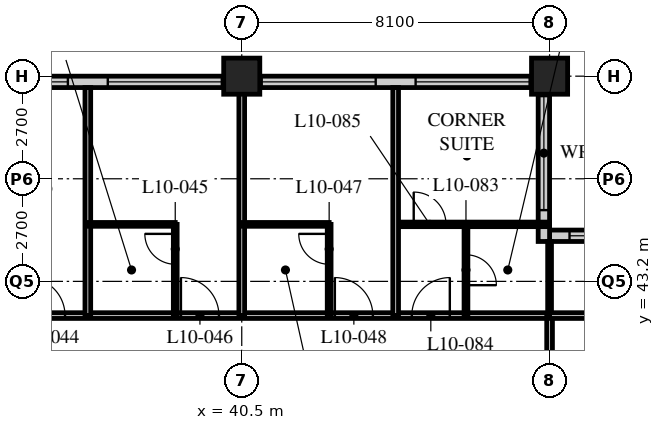
"""IFC4 building model, lengths in metres.
Left out: names, types, materials, properties, quantities, classifications, styles, units other than length and angle.
Written with IfcOpenShell. Run it as: python <this file> out.ifc"""

import sys

from ifc_helpers import new_model, si_unit, direction, frame, frame_2d, origin, origin_2d, place, context, subcontext, project, spatial, rectangle, hollow_rectangle, extrude, element, fill, save


model = new_model("IFC4")
c1 = context("Model", 3, precision=1e-05, world=origin(), true_north=direction((0.0, 1.0)))
c2 = subcontext(c1, "Body", "Model", "MODEL_VIEW")
j1 = project(units=[si_unit("LENGTHUNIT", "METRE"), si_unit("PLANEANGLEUNIT", "RADIAN")], contexts=[c1])
p1 = place(None, origin())
s1 = spatial("IfcSite", under=j1, at=p1, CompositionType="ELEMENT")
p2 = place(p1, origin())
s2 = spatial("IfcBuilding", under=s1, at=p2, CompositionType="ELEMENT")
p3 = place(p2, frame((0.0, 0.0, 46.6)))
s3 = spatial("IfcBuildingStorey", under=s2, at=p3, CompositionType="ELEMENT", Elevation=46.6)
for number, where, z_axis, x_axis in (
    (1, (40.5, 48.6, 0.0), (0.0, 0.0, 1.0), (1.0, 0.0, 0.0)),
    (2, (48.6, 48.6, 0.0), (0.0, 0.0, 1.0), (1.0, 0.0, 0.0)),
):
    element("IfcColumn", number, at=place(p3, frame(where, z_axis=z_axis, x_axis=x_axis)), inside=s3, PredefinedType="COLUMN", context=c2, shape_type="SweptSolid", body=[
        extrude(hollow_rectangle(XDim=0.95, YDim=0.95, WallThickness=0.095, at=origin_2d()), origin(), (0.0, 0.0, 1.0), 3.4),
    ])
p4 = place(p3, frame((52.35, 44.4, 0.0), z_axis=(0.0, 0.0, 1.0), x_axis=(-1.0, 0.0, 0.0)))
e3 = element("IfcWall", 3, at=p4, inside=s3, PredefinedType="SOLIDWALL", context=c2, shape_type="SweptSolid", body=[
    extrude(rectangle(XDim=3.75, YDim=0.3, at=frame_2d((1.875, 0.0))), origin(), (0.0, 0.0, 1.0), 3.19),
])
p5 = place(p4, frame((0.225, 0.0, 0.9)))
e4 = element("IfcOpeningElement", 4, at=p5, cuts=e3, PredefinedType="OPENING", context=c2, shape_type="SweptSolid", body=[
    extrude(rectangle(XDim=3.0, YDim=1.5, at=frame_2d((1.5, 0.75))), frame((0.0, 0.16, 0.0), z_axis=(0.0, -1.0, 0.0), x_axis=(1.0, 0.0, 0.0)), (0.0, 0.0, 1.0), 0.32),
])
p6 = place(p3, frame((48.45, 44.25, 0.0), z_axis=(0.0, 0.0, 1.0), x_axis=(0.0, 1.0, 0.0)))
e5 = element("IfcWall", 5, at=p6, inside=s3, PredefinedType="SOLIDWALL", context=c2, shape_type="SweptSolid", body=[
    extrude(rectangle(XDim=4.35, YDim=0.3, at=frame_2d((2.175, 0.0))), origin(), (0.0, 0.0, 1.0), 3.19),
])
p7 = place(p6, frame((0.825, 0.0, 0.9)))
e6 = element("IfcOpeningElement", 6, at=p7, cuts=e5, PredefinedType="OPENING", context=c2, shape_type="SweptSolid", body=[
    extrude(rectangle(XDim=3.0, YDim=1.5, at=frame_2d((1.5, 0.75))), frame((0.0, 0.16, 0.0), z_axis=(0.0, -1.0, 0.0), x_axis=(1.0, 0.0, 0.0)), (0.0, 0.0, 1.0), 0.32),
])
p8 = place(p3, frame((48.3, 48.45, 0.0), z_axis=(0.0, 0.0, 1.0), x_axis=(-1.0, 0.0, 0.0)))
e7 = element("IfcWall", 7, at=p8, inside=s3, PredefinedType="SOLIDWALL", context=c2, shape_type="SweptSolid", body=[
    extrude(rectangle(XDim=40.2, YDim=0.3, at=frame_2d((20.1, 0.0))), origin(), (0.0, 0.0, 1.0), 3.19),
])
p9 = place(p8, frame((0.225, 0.0, 0.9)))
e8 = element("IfcOpeningElement", 8, at=p9, cuts=e7, PredefinedType="OPENING", context=c2, shape_type="SweptSolid", body=[
    extrude(rectangle(XDim=3.0, YDim=2.0, at=frame_2d((1.5, 1.0))), frame((0.0, 0.16, 0.0), z_axis=(0.0, -1.0, 0.0), x_axis=(1.0, 0.0, 0.0)), (0.0, 0.0, 1.0), 0.32),
])
p10 = place(p8, frame((4.275, 0.0, 0.9)))
e9 = element("IfcOpeningElement", 9, at=p10, cuts=e7, PredefinedType="OPENING", context=c2, shape_type="SweptSolid", body=[
    extrude(rectangle(XDim=3.0, YDim=2.0, at=frame_2d((1.5, 1.0))), frame((0.0, 0.16, 0.0), z_axis=(0.0, -1.0, 0.0), x_axis=(1.0, 0.0, 0.0)), (0.0, 0.0, 1.0), 0.32),
])
p11 = place(p8, frame((8.325, 0.0, 0.9)))
e10 = element("IfcOpeningElement", 10, at=p11, cuts=e7, PredefinedType="OPENING", context=c2, shape_type="SweptSolid", body=[
    extrude(rectangle(XDim=3.0, YDim=2.0, at=frame_2d((1.5, 1.0))), frame((0.0, 0.16, 0.0), z_axis=(0.0, -1.0, 0.0), x_axis=(1.0, 0.0, 0.0)), (0.0, 0.0, 1.0), 0.32),
])
p12 = place(p8, frame((12.375, 0.0, 0.9)))
e11 = element("IfcOpeningElement", 11, at=p12, cuts=e7, PredefinedType="OPENING", context=c2, shape_type="SweptSolid", body=[
    extrude(rectangle(XDim=3.0, YDim=2.0, at=frame_2d((1.5, 1.0))), frame((0.0, 0.16, 0.0), z_axis=(0.0, -1.0, 0.0), x_axis=(1.0, 0.0, 0.0)), (0.0, 0.0, 1.0), 0.32),
])
p13 = place(p8, frame((16.425, 0.0, 0.9)))
e12 = element("IfcOpeningElement", 12, at=p13, cuts=e7, PredefinedType="OPENING", context=c2, shape_type="SweptSolid", body=[
    extrude(rectangle(XDim=3.0, YDim=2.0, at=frame_2d((1.5, 1.0))), frame((0.0, 0.16, 0.0), z_axis=(0.0, -1.0, 0.0), x_axis=(1.0, 0.0, 0.0)), (0.0, 0.0, 1.0), 0.32),
])
p14 = place(p8, frame((20.475, 0.0, 0.9)))
e13 = element("IfcOpeningElement", 13, at=p14, cuts=e7, PredefinedType="OPENING", context=c2, shape_type="SweptSolid", body=[
    extrude(rectangle(XDim=3.0, YDim=2.0, at=frame_2d((1.5, 1.0))), frame((0.0, 0.16, 0.0), z_axis=(0.0, -1.0, 0.0), x_axis=(1.0, 0.0, 0.0)), (0.0, 0.0, 1.0), 0.32),
])
p15 = place(p8, frame((24.525, 0.0, 0.9)))
e14 = element("IfcOpeningElement", 14, at=p15, cuts=e7, PredefinedType="OPENING", context=c2, shape_type="SweptSolid", body=[
    extrude(rectangle(XDim=3.0, YDim=2.0, at=frame_2d((1.5, 1.0))), frame((0.0, 0.16, 0.0), z_axis=(0.0, -1.0, 0.0), x_axis=(1.0, 0.0, 0.0)), (0.0, 0.0, 1.0), 0.32),
])
p16 = place(p8, frame((28.575, 0.0, 0.9)))
e15 = element("IfcOpeningElement", 15, at=p16, cuts=e7, PredefinedType="OPENING", context=c2, shape_type="SweptSolid", body=[
    extrude(rectangle(XDim=3.0, YDim=2.0, at=frame_2d((1.5, 1.0))), frame((0.0, 0.16, 0.0), z_axis=(0.0, -1.0, 0.0), x_axis=(1.0, 0.0, 0.0)), (0.0, 0.0, 1.0), 0.32),
])
p17 = place(p8, frame((32.625, 0.0, 0.9)))
e16 = element("IfcOpeningElement", 16, at=p17, cuts=e7, PredefinedType="OPENING", context=c2, shape_type="SweptSolid", body=[
    extrude(rectangle(XDim=3.0, YDim=2.0, at=frame_2d((1.5, 1.0))), frame((0.0, 0.16, 0.0), z_axis=(0.0, -1.0, 0.0), x_axis=(1.0, 0.0, 0.0)), (0.0, 0.0, 1.0), 0.32),
])
p18 = place(p8, frame((36.675, 0.0, 0.9)))
e17 = element("IfcOpeningElement", 17, at=p18, cuts=e7, PredefinedType="OPENING", context=c2, shape_type="SweptSolid", body=[
    extrude(rectangle(XDim=3.0, YDim=2.0, at=frame_2d((1.5, 1.0))), frame((0.0, 0.16, 0.0), z_axis=(0.0, -1.0, 0.0), x_axis=(1.0, 0.0, 0.0)), (0.0, 0.0, 1.0), 0.32),
])
p19 = place(p3, frame((8.1, 42.3, 0.0), z_axis=(0.0, 0.0, 1.0), x_axis=(1.0, 0.0, 0.0)))
e18 = element("IfcWall", 18, at=p19, inside=s3, PredefinedType="PARTITIONING", context=c2, shape_type="SweptSolid", body=[
    extrude(rectangle(XDim=40.5, YDim=0.15, at=frame_2d((20.25, 0.0))), origin(), (0.0, 0.0, 1.0), 3.19),
])
p20 = place(p19, frame((6.5, 0.0, 0.0)))
e19 = element("IfcOpeningElement", 19, at=p20, cuts=e18, PredefinedType="OPENING", context=c2, shape_type="SweptSolid", body=[
    extrude(rectangle(XDim=1.0, YDim=2.1, at=frame_2d((0.5, 1.05))), frame((0.0, 0.085, 0.0), z_axis=(0.0, -1.0, 0.0), x_axis=(1.0, 0.0, 0.0)), (0.0, 0.0, 1.0), 0.17),
])
p21 = place(p19, frame((10.55, 0.0, 0.0)))
e20 = element("IfcOpeningElement", 20, at=p21, cuts=e18, PredefinedType="OPENING", context=c2, shape_type="SweptSolid", body=[
    extrude(rectangle(XDim=1.0, YDim=2.1, at=frame_2d((0.5, 1.05))), frame((0.0, 0.085, 0.0), z_axis=(0.0, -1.0, 0.0), x_axis=(1.0, 0.0, 0.0)), (0.0, 0.0, 1.0), 0.17),
])
p22 = place(p19, frame((14.6, 0.0, 0.0)))
e21 = element("IfcOpeningElement", 21, at=p22, cuts=e18, PredefinedType="OPENING", context=c2, shape_type="SweptSolid", body=[
    extrude(rectangle(XDim=1.0, YDim=2.1, at=frame_2d((0.5, 1.05))), frame((0.0, 0.085, 0.0), z_axis=(0.0, -1.0, 0.0), x_axis=(1.0, 0.0, 0.0)), (0.0, 0.0, 1.0), 0.17),
])
p23 = place(p19, frame((18.65, 0.0, 0.0)))
e22 = element("IfcOpeningElement", 22, at=p23, cuts=e18, PredefinedType="OPENING", context=c2, shape_type="SweptSolid", body=[
    extrude(rectangle(XDim=1.0, YDim=2.1, at=frame_2d((0.5, 1.05))), frame((0.0, 0.085, 0.0), z_axis=(0.0, -1.0, 0.0), x_axis=(1.0, 0.0, 0.0)), (0.0, 0.0, 1.0), 0.17),
])
p24 = place(p19, frame((22.7, 0.0, 0.0)))
e23 = element("IfcOpeningElement", 23, at=p24, cuts=e18, PredefinedType="OPENING", context=c2, shape_type="SweptSolid", body=[
    extrude(rectangle(XDim=1.0, YDim=2.1, at=frame_2d((0.5, 1.05))), frame((0.0, 0.085, 0.0), z_axis=(0.0, -1.0, 0.0), x_axis=(1.0, 0.0, 0.0)), (0.0, 0.0, 1.0), 0.17),
])
p25 = place(p19, frame((26.75, 0.0, 0.0)))
e24 = element("IfcOpeningElement", 24, at=p25, cuts=e18, PredefinedType="OPENING", context=c2, shape_type="SweptSolid", body=[
    extrude(rectangle(XDim=1.0, YDim=2.1, at=frame_2d((0.5, 1.05))), frame((0.0, 0.085, 0.0), z_axis=(0.0, -1.0, 0.0), x_axis=(1.0, 0.0, 0.0)), (0.0, 0.0, 1.0), 0.17),
])
p26 = place(p19, frame((30.8, 0.0, 0.0)))
e25 = element("IfcOpeningElement", 25, at=p26, cuts=e18, PredefinedType="OPENING", context=c2, shape_type="SweptSolid", body=[
    extrude(rectangle(XDim=1.0, YDim=2.1, at=frame_2d((0.5, 1.05))), frame((0.0, 0.085, 0.0), z_axis=(0.0, -1.0, 0.0), x_axis=(1.0, 0.0, 0.0)), (0.0, 0.0, 1.0), 0.17),
])
p27 = place(p19, frame((34.85, 0.0, 0.0)))
e26 = element("IfcOpeningElement", 26, at=p27, cuts=e18, PredefinedType="OPENING", context=c2, shape_type="SweptSolid", body=[
    extrude(rectangle(XDim=1.0, YDim=2.1, at=frame_2d((0.5, 1.05))), frame((0.0, 0.085, 0.0), z_axis=(0.0, -1.0, 0.0), x_axis=(1.0, 0.0, 0.0)), (0.0, 0.0, 1.0), 0.17),
])
p28 = place(p19, frame((36.875, 0.0, 0.0)))
e27 = element("IfcOpeningElement", 27, at=p28, cuts=e18, PredefinedType="OPENING", context=c2, shape_type="SweptSolid", body=[
    extrude(rectangle(XDim=1.0, YDim=2.1, at=frame_2d((0.5, 1.05))), frame((0.0, 0.085, 0.0), z_axis=(0.0, -1.0, 0.0), x_axis=(1.0, 0.0, 0.0)), (0.0, 0.0, 1.0), 0.17),
])
p29 = place(p19, frame((2.625, 0.0, 0.0)))
e28 = element("IfcOpeningElement", 28, at=p29, cuts=e18, PredefinedType="OPENING", context=c2, shape_type="SweptSolid", body=[
    extrude(rectangle(XDim=1.0, YDim=2.1, at=frame_2d((0.5, 1.05))), frame((0.0, 0.085, 0.0), z_axis=(0.0, -1.0, 0.0), x_axis=(1.0, 0.0, 0.0)), (0.0, 0.0, 1.0), 0.17),
])
p30 = place(p3, frame((48.6, 16.2, 0.0), z_axis=(0.0, 0.0, 1.0), x_axis=(0.0, 1.0, 0.0)))
e29 = element("IfcWall", 29, at=p30, inside=s3, PredefinedType="PARTITIONING", context=c2, shape_type="SweptSolid", body=[
    extrude(rectangle(XDim=26.1, YDim=0.15, at=frame_2d((13.05, 0.0))), origin(), (0.0, 0.0, 1.0), 2.578),
])
p31 = place(p30, frame((2.75, 0.0, 0.0)))
e30 = element("IfcOpeningElement", 30, at=p31, cuts=e29, PredefinedType="OPENING", context=c2, shape_type="SweptSolid", body=[
    extrude(rectangle(XDim=1.0, YDim=2.1, at=frame_2d((0.5, 1.05))), frame((0.0, 0.085, 0.0), z_axis=(0.0, -1.0, 0.0), x_axis=(1.0, 0.0, 0.0)), (0.0, 0.0, 1.0), 0.17),
])
p32 = place(p30, frame((4.35, 0.0, 0.0)))
e31 = element("IfcOpeningElement", 31, at=p32, cuts=e29, PredefinedType="OPENING", context=c2, shape_type="SweptSolid", body=[
    extrude(rectangle(XDim=1.0, YDim=2.1, at=frame_2d((0.5, 1.05))), frame((0.0, 0.085, 0.0), z_axis=(0.0, -1.0, 0.0), x_axis=(1.0, 0.0, 0.0)), (0.0, 0.0, 1.0), 0.17),
])
p33 = place(p30, frame((10.85, 0.0, 0.0)))
e32 = element("IfcOpeningElement", 32, at=p33, cuts=e29, PredefinedType="OPENING", context=c2, shape_type="SweptSolid", body=[
    extrude(rectangle(XDim=1.0, YDim=2.1, at=frame_2d((0.5, 1.05))), frame((0.0, 0.085, 0.0), z_axis=(0.0, -1.0, 0.0), x_axis=(1.0, 0.0, 0.0)), (0.0, 0.0, 1.0), 0.17),
])
p34 = place(p30, frame((12.45, 0.0, 0.0)))
e33 = element("IfcOpeningElement", 33, at=p34, cuts=e29, PredefinedType="OPENING", context=c2, shape_type="SweptSolid", body=[
    extrude(rectangle(XDim=1.0, YDim=2.1, at=frame_2d((0.5, 1.05))), frame((0.0, 0.085, 0.0), z_axis=(0.0, -1.0, 0.0), x_axis=(1.0, 0.0, 0.0)), (0.0, 0.0, 1.0), 0.17),
])
p35 = place(p30, frame((18.65, 0.0, 0.0)))
e34 = element("IfcOpeningElement", 34, at=p35, cuts=e29, PredefinedType="OPENING", context=c2, shape_type="SweptSolid", body=[
    extrude(rectangle(XDim=1.0, YDim=2.1, at=frame_2d((0.5, 1.05))), frame((0.0, 0.085, 0.0), z_axis=(0.0, -1.0, 0.0), x_axis=(1.0, 0.0, 0.0)), (0.0, 0.0, 1.0), 0.17),
])
p36 = place(p30, frame((22.7, 0.0, 0.0)))
e35 = element("IfcOpeningElement", 35, at=p36, cuts=e29, PredefinedType="OPENING", context=c2, shape_type="SweptSolid", body=[
    extrude(rectangle(XDim=1.0, YDim=2.1, at=frame_2d((0.5, 1.05))), frame((0.0, 0.085, 0.0), z_axis=(0.0, -1.0, 0.0), x_axis=(1.0, 0.0, 0.0)), (0.0, 0.0, 1.0), 0.17),
])
p37 = place(p3, frame((36.45, 42.3, 0.0), z_axis=(0.0, 0.0, 1.0), x_axis=(0.0, 1.0, 0.0)))
e36 = element("IfcWall", 36, at=p37, inside=s3, PredefinedType="PARTITIONING", context=c2, shape_type="SweptSolid", body=[
    extrude(rectangle(XDim=6.0, YDim=0.15, at=frame_2d((3.0, 0.0))), origin(), (0.0, 0.0, 1.0), 3.19),
])
p38 = place(p3, frame((36.45, 44.7, 0.0), z_axis=(0.0, 0.0, 1.0), x_axis=(1.0, 0.0, 0.0)))
e37 = element("IfcWall", 37, at=p38, inside=s3, PredefinedType="PARTITIONING", context=c2, shape_type="SweptSolid", body=[
    extrude(rectangle(XDim=2.3, YDim=0.1, at=frame_2d((1.15, 0.0))), origin(), (0.0, 0.0, 1.0), 3.19),
])
p39 = place(p3, frame((38.75, 42.3, 0.0), z_axis=(0.0, 0.0, 1.0), x_axis=(0.0, 1.0, 0.0)))
e38 = element("IfcWall", 38, at=p39, inside=s3, PredefinedType="PARTITIONING", context=c2, shape_type="SweptSolid", body=[
    extrude(rectangle(XDim=2.4, YDim=0.1, at=frame_2d((1.2, 0.0))), origin(), (0.0, 0.0, 1.0), 3.19),
])
p40 = place(p39, frame((1.35, 0.0, 0.0)))
e39 = element("IfcOpeningElement", 39, at=p40, cuts=e38, PredefinedType="OPENING", context=c2, shape_type="SweptSolid", body=[
    extrude(rectangle(XDim=0.8, YDim=2.1, at=frame_2d((0.4, 1.05))), frame((0.0, 0.06, 0.0), z_axis=(0.0, -1.0, 0.0), x_axis=(1.0, 0.0, 0.0)), (0.0, 0.0, 1.0), 0.12),
])
p41 = place(p3, frame((40.5, 42.3, 0.0), z_axis=(0.0, 0.0, 1.0), x_axis=(0.0, 1.0, 0.0)))
e40 = element("IfcWall", 40, at=p41, inside=s3, PredefinedType="PARTITIONING", context=c2, shape_type="SweptSolid", body=[
    extrude(rectangle(XDim=6.0, YDim=0.15, at=frame_2d((3.0, 0.0))), origin(), (0.0, 0.0, 1.0), 2.578),
])
p42 = place(p3, frame((40.5, 44.7, 0.0), z_axis=(0.0, 0.0, 1.0), x_axis=(1.0, 0.0, 0.0)))
e41 = element("IfcWall", 41, at=p42, inside=s3, PredefinedType="PARTITIONING", context=c2, shape_type="SweptSolid", body=[
    extrude(rectangle(XDim=2.3, YDim=0.1, at=frame_2d((1.15, 0.0))), origin(), (0.0, 0.0, 1.0), 3.19),
])
p43 = place(p3, frame((42.8, 42.3, 0.0), z_axis=(0.0, 0.0, 1.0), x_axis=(0.0, 1.0, 0.0)))
e42 = element("IfcWall", 42, at=p43, inside=s3, PredefinedType="PARTITIONING", context=c2, shape_type="SweptSolid", body=[
    extrude(rectangle(XDim=2.4, YDim=0.1, at=frame_2d((1.2, 0.0))), origin(), (0.0, 0.0, 1.0), 3.19),
])
p44 = place(p43, frame((1.35, 0.0, 0.0)))
e43 = element("IfcOpeningElement", 43, at=p44, cuts=e42, PredefinedType="OPENING", context=c2, shape_type="SweptSolid", body=[
    extrude(rectangle(XDim=0.8, YDim=2.1, at=frame_2d((0.4, 1.05))), frame((0.0, 0.06, 0.0), z_axis=(0.0, -1.0, 0.0), x_axis=(1.0, 0.0, 0.0)), (0.0, 0.0, 1.0), 0.12),
])
p45 = place(p3, frame((44.55, 44.7, 0.0), z_axis=(0.0, 0.0, 1.0), x_axis=(1.0, 0.0, 0.0)))
e44 = element("IfcWall", 44, at=p45, inside=s3, PredefinedType="PARTITIONING", context=c2, shape_type="SweptSolid", body=[
    extrude(rectangle(XDim=4.05, YDim=0.12, at=frame_2d((2.025, 0.0))), origin(), (0.0, 0.0, 1.0), 3.19),
])
p46 = place(p45, frame((0.475, 0.0, 0.0)))
e45 = element("IfcOpeningElement", 45, at=p46, cuts=e44, PredefinedType="OPENING", context=c2, shape_type="SweptSolid", body=[
    extrude(rectangle(XDim=0.85, YDim=2.1, at=frame_2d((0.425, 1.05))), frame((0.0, 0.07, 0.0), z_axis=(0.0, -1.0, 0.0), x_axis=(1.0, 0.0, 0.0)), (0.0, 0.0, 1.0), 0.14),
])
p47 = place(p3, frame((46.4, 42.3, 0.0), z_axis=(0.0, 0.0, 1.0), x_axis=(0.0, 1.0, 0.0)))
e46 = element("IfcWall", 46, at=p47, inside=s3, PredefinedType="PARTITIONING", context=c2, shape_type="SweptSolid", body=[
    extrude(rectangle(XDim=2.4, YDim=0.1, at=frame_2d((1.2, 0.0))), origin(), (0.0, 0.0, 1.0), 3.19),
])
p48 = place(p47, frame((0.8, 0.0, 0.0)))
e47 = element("IfcOpeningElement", 47, at=p48, cuts=e46, PredefinedType="OPENING", context=c2, shape_type="SweptSolid", body=[
    extrude(rectangle(XDim=0.8, YDim=2.1, at=frame_2d((0.4, 1.05))), frame((0.0, 0.06, 0.0), z_axis=(0.0, -1.0, 0.0), x_axis=(1.0, 0.0, 0.0)), (0.0, 0.0, 1.0), 0.12),
])
p49 = place(p3, frame((48.6, 42.3, 0.0), z_axis=(0.0, 0.0, 1.0), x_axis=(0.0, 1.0, 0.0)))
e48 = element("IfcWall", 48, at=p49, inside=s3, PredefinedType="PARTITIONING", context=c2, shape_type="SweptSolid", body=[
    extrude(rectangle(XDim=1.95, YDim=0.1, at=frame_2d((0.975, 0.0))), origin(), (0.0, 0.0, 1.0), 2.578),
])
p50 = place(p3, frame((48.6, 42.3, 0.0), z_axis=(0.0, 0.0, 1.0), x_axis=(1.0, 0.0, 0.0)))
e49 = element("IfcWall", 49, at=p50, inside=s3, PredefinedType="PARTITIONING", context=c2, shape_type="SweptSolid", body=[
    extrude(rectangle(XDim=3.75, YDim=0.15, at=frame_2d((1.875, 0.0))), origin(), (0.0, 0.0, 1.0), 3.19),
])
p51 = place(p3, frame((44.55, 42.3, 0.0), z_axis=(0.0, 0.0, 1.0), x_axis=(0.0, 1.0, 0.0)))
e50 = element("IfcWall", 50, at=p51, inside=s3, PredefinedType="PARTITIONING", context=c2, shape_type="SweptSolid", body=[
    extrude(rectangle(XDim=6.0, YDim=0.15, at=frame_2d((3.0, 0.0))), origin(), (0.0, 0.0, 1.0), 3.19),
])
p52 = place(p5, origin())
e51 = element("IfcWindow", 51, at=p52, inside=s3, PartitioningType="SINGLE_PANEL", PredefinedType="WINDOW", context=c2, shape_type="SweptSolid", body=[
    extrude(rectangle(XDim=3.0, YDim=1.5, at=frame_2d((1.5, 0.75))), frame((0.0, 0.03, 0.0), z_axis=(0.0, -1.0, 0.0), x_axis=(1.0, 0.0, 0.0)), (0.0, 0.0, 1.0), 0.06),
])
fill(e4, e51)
p53 = place(p7, origin())
e52 = element("IfcWindow", 52, at=p53, inside=s3, PartitioningType="SINGLE_PANEL", PredefinedType="WINDOW", context=c2, shape_type="SweptSolid", body=[
    extrude(rectangle(XDim=3.0, YDim=1.5, at=frame_2d((1.5, 0.75))), frame((0.0, 0.03, 0.0), z_axis=(0.0, -1.0, 0.0), x_axis=(1.0, 0.0, 0.0)), (0.0, 0.0, 1.0), 0.06),
])
fill(e6, e52)
p54 = place(p9, origin())
e53 = element("IfcWindow", 53, at=p54, inside=s3, PartitioningType="SINGLE_PANEL", PredefinedType="WINDOW", context=c2, shape_type="SweptSolid", body=[
    extrude(rectangle(XDim=3.0, YDim=2.0, at=frame_2d((1.5, 1.0))), frame((0.0, 0.03, 0.0), z_axis=(0.0, -1.0, 0.0), x_axis=(1.0, 0.0, 0.0)), (0.0, 0.0, 1.0), 0.06),
])
fill(e8, e53)
p55 = place(p10, origin())
e54 = element("IfcWindow", 54, at=p55, inside=s3, PartitioningType="SINGLE_PANEL", PredefinedType="WINDOW", context=c2, shape_type="SweptSolid", body=[
    extrude(rectangle(XDim=3.0, YDim=2.0, at=frame_2d((1.5, 1.0))), frame((0.0, 0.03, 0.0), z_axis=(0.0, -1.0, 0.0), x_axis=(1.0, 0.0, 0.0)), (0.0, 0.0, 1.0), 0.06),
])
fill(e9, e54)
p56 = place(p11, origin())
e55 = element("IfcWindow", 55, at=p56, inside=s3, PartitioningType="SINGLE_PANEL", PredefinedType="WINDOW", context=c2, shape_type="SweptSolid", body=[
    extrude(rectangle(XDim=3.0, YDim=2.0, at=frame_2d((1.5, 1.0))), frame((0.0, 0.03, 0.0), z_axis=(0.0, -1.0, 0.0), x_axis=(1.0, 0.0, 0.0)), (0.0, 0.0, 1.0), 0.06),
])
fill(e10, e55)
p57 = place(p12, origin())
e56 = element("IfcWindow", 56, at=p57, inside=s3, PartitioningType="SINGLE_PANEL", PredefinedType="WINDOW", context=c2, shape_type="SweptSolid", body=[
    extrude(rectangle(XDim=3.0, YDim=2.0, at=frame_2d((1.5, 1.0))), frame((0.0, 0.03, 0.0), z_axis=(0.0, -1.0, 0.0), x_axis=(1.0, 0.0, 0.0)), (0.0, 0.0, 1.0), 0.06),
])
fill(e11, e56)
p58 = place(p25, origin())
e57 = element("IfcDoor", 57, at=p58, inside=s3, OperationType="SINGLE_SWING_LEFT", PredefinedType="DOOR", context=c2, shape_type="SweptSolid", body=[
    extrude(rectangle(XDim=1.0, YDim=2.1, at=frame_2d((0.5, 1.05))), frame((0.0, 0.025, 0.0), z_axis=(0.0, -1.0, 0.0), x_axis=(1.0, 0.0, 0.0)), (0.0, 0.0, 1.0), 0.05),
])
fill(e24, e57)
p59 = place(p40, origin())
e58 = element("IfcDoor", 58, at=p59, inside=s3, OperationType="SINGLE_SWING_RIGHT", PredefinedType="DOOR", context=c2, shape_type="SweptSolid", body=[
    extrude(rectangle(XDim=0.8, YDim=2.1, at=frame_2d((0.4, 1.05))), frame((0.0, 0.025, 0.0), z_axis=(0.0, -1.0, 0.0), x_axis=(1.0, 0.0, 0.0)), (0.0, 0.0, 1.0), 0.05),
])
fill(e39, e58)
p60 = place(p26, origin())
e59 = element("IfcDoor", 59, at=p60, inside=s3, OperationType="SINGLE_SWING_LEFT", PredefinedType="DOOR", context=c2, shape_type="SweptSolid", body=[
    extrude(rectangle(XDim=1.0, YDim=2.1, at=frame_2d((0.5, 1.05))), frame((0.0, 0.025, 0.0), z_axis=(0.0, -1.0, 0.0), x_axis=(1.0, 0.0, 0.0)), (0.0, 0.0, 1.0), 0.05),
])
fill(e25, e59)
p61 = place(p44, origin())
e60 = element("IfcDoor", 60, at=p61, inside=s3, OperationType="SINGLE_SWING_RIGHT", PredefinedType="DOOR", context=c2, shape_type="SweptSolid", body=[
    extrude(rectangle(XDim=0.8, YDim=2.1, at=frame_2d((0.4, 1.05))), frame((0.0, 0.025, 0.0), z_axis=(0.0, -1.0, 0.0), x_axis=(1.0, 0.0, 0.0)), (0.0, 0.0, 1.0), 0.05),
])
fill(e43, e60)
p62 = place(p27, origin())
e61 = element("IfcDoor", 61, at=p62, inside=s3, OperationType="SINGLE_SWING_LEFT", PredefinedType="DOOR", context=c2, shape_type="SweptSolid", body=[
    extrude(rectangle(XDim=1.0, YDim=2.1, at=frame_2d((0.5, 1.05))), frame((0.0, 0.025, 0.0), z_axis=(0.0, -1.0, 0.0), x_axis=(1.0, 0.0, 0.0)), (0.0, 0.0, 1.0), 0.05),
])
fill(e26, e61)
p63 = place(p48, origin())
e62 = element("IfcDoor", 62, at=p63, inside=s3, OperationType="SINGLE_SWING_RIGHT", PredefinedType="DOOR", context=c2, shape_type="SweptSolid", body=[
    extrude(rectangle(XDim=0.8, YDim=2.1, at=frame_2d((0.4, 1.05))), frame((0.0, 0.025, 0.0), z_axis=(0.0, -1.0, 0.0), x_axis=(1.0, 0.0, 0.0)), (0.0, 0.0, 1.0), 0.05),
])
fill(e47, e62)
p64 = place(p28, origin())
e63 = element("IfcDoor", 63, at=p64, inside=s3, OperationType="SINGLE_SWING_RIGHT", PredefinedType="DOOR", context=c2, shape_type="SweptSolid", body=[
    extrude(rectangle(XDim=1.0, YDim=2.1, at=frame_2d((0.5, 1.05))), frame((0.0, 0.025, 0.0), z_axis=(0.0, -1.0, 0.0), x_axis=(1.0, 0.0, 0.0)), (0.0, 0.0, 1.0), 0.05),
])
fill(e27, e63)
p65 = place(p46, origin())
e64 = element("IfcDoor", 64, at=p65, inside=s3, OperationType="SINGLE_SWING_LEFT", PredefinedType="DOOR", context=c2, shape_type="SweptSolid", body=[
    extrude(rectangle(XDim=0.85, YDim=2.1, at=frame_2d((0.425, 1.05))), frame((0.0, 0.025, 0.0), z_axis=(0.0, -1.0, 0.0), x_axis=(1.0, 0.0, 0.0)), (0.0, 0.0, 1.0), 0.05),
])
fill(e45, e64)
save(model, sys.argv[1])
